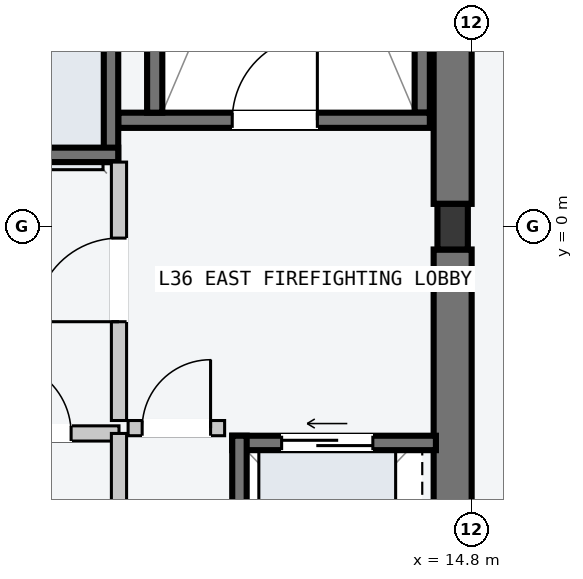
"""IFC4 building model, lengths in metres.
Left out: names, types, materials, properties, quantities, classifications, styles, units other than length and angle.
Written with IfcOpenShell. Run it as: python <this file> out.ifc"""

import sys

from ifc_helpers import new_model, si_unit, direction, frame, frame_2d, origin, origin_2d, place, context, subcontext, project, spatial, rectangle, i_section, extrude, element, fill, save


model = new_model("IFC4")
c1 = context("Model", 3, precision=1e-05, world=origin(), true_north=direction((0.0, 1.0)))
c2 = subcontext(c1, "Body", "Model", "MODEL_VIEW")
j1 = project(units=[si_unit("LENGTHUNIT", "METRE"), si_unit("PLANEANGLEUNIT", "RADIAN")], contexts=[c1])
p1 = place(None, origin())
s1 = spatial("IfcSite", under=j1, at=p1, CompositionType="ELEMENT")
p2 = place(p1, origin())
s2 = spatial("IfcBuilding", under=s1, at=p2, CompositionType="ELEMENT")
p3 = place(p2, frame((0.0, 0.0, 138.6)))
s3 = spatial("IfcBuildingStorey", under=s2, at=p3, CompositionType="ELEMENT", Elevation=138.6)
for number, where, z_axis, x_axis in (
    (1, (14.55, -9.45, -0.2), (0.0, 0.0, 1.0), (0.0, 1.0, 0.0)),
    (2, (14.55, 0.3, -0.2), (0.0, 0.0, 1.0), (0.0, 1.0, 0.0)),
):
    element("IfcWall", number, at=place(p3, frame(where, z_axis=z_axis, x_axis=x_axis)), inside=s3, PredefinedType="SHEAR", context=c2, shape_type="SweptSolid", body=[
        extrude(rectangle(XDim=9.15, YDim=0.5, at=frame_2d((4.575, 0.0))), origin(), (0.0, 0.0, 1.0), 3.6),
    ])
p4 = place(p3, frame((14.15, 1.5, -0.2), z_axis=(0.0, 0.0, 1.0), x_axis=(0.0, 1.0, 0.0)))
e3 = element("IfcWall", 3, at=p4, inside=s3, PredefinedType="SOLIDWALL", context=c2, shape_type="SweptSolid", body=[
    extrude(rectangle(XDim=7.8, YDim=0.2, at=frame_2d((3.9, 0.0))), origin(), (0.0, 0.0, 1.0), 3.6),
])
p5 = place(p3, frame((10.15, 1.4, -0.2), z_axis=(0.0, 0.0, 1.0), x_axis=(1.0, 0.0, 0.0)))
e4 = element("IfcWall", 4, at=p5, inside=s3, PredefinedType="SOLIDWALL", context=c2, shape_type="SweptSolid", body=[
    extrude(rectangle(XDim=4.1, YDim=0.2, at=frame_2d((2.05, 0.0))), origin(), (0.0, 0.0, 1.0), 3.6),
])
p6 = place(p5, frame((1.5, 0.0, 0.2)))
e5 = element("IfcOpeningElement", 5, at=p6, cuts=e4, PredefinedType="OPENING", context=c2, shape_type="SweptSolid", body=[
    extrude(rectangle(XDim=1.12, YDim=2.18, at=frame_2d((0.56, 1.09))), frame((0.0, 0.11, 0.0), z_axis=(0.0, -1.0, 0.0), x_axis=(1.0, 0.0, 0.0)), (0.0, 0.0, 1.0), 0.22),
])
p7 = place(p3, frame((10.63, 1.5, -0.2), z_axis=(0.0, 0.0, 1.0), x_axis=(0.0, 1.0, 0.0)))
e6 = element("IfcWall", 6, at=p7, inside=s3, PredefinedType="SOLIDWALL", context=c2, shape_type="SweptSolid", body=[
    extrude(rectangle(XDim=7.8, YDim=0.2, at=frame_2d((3.9, 0.0))), origin(), (0.0, 0.0, 1.0), 3.6),
])
p8 = place(p3, frame((14.55, 0.0, 0.0), z_axis=(0.0, 0.0, 1.0), x_axis=(1.0, 0.0, 0.0)))
e7 = element("IfcColumn", 7, at=p8, inside=s3, PredefinedType="COLUMN", context=c2, shape_type="SweptSolid", body=[
    extrude(i_section(OverallWidth=0.4, OverallDepth=0.6, WebThickness=0.022, FlangeThickness=0.036, at=origin_2d()), origin(), (0.0, 0.0, 1.0), 3.6),
])
p9 = place(p3, frame((10.055, 0.85, -0.2), z_axis=(0.0, 0.0, 1.0), x_axis=(0.0, 1.0, 0.0)))
e8 = element("IfcWall", 8, at=p9, inside=s3, PredefinedType="SOLIDWALL", context=c2, shape_type="SweptSolid", body=[
    extrude(rectangle(XDim=1.9, YDim=0.19, at=frame_2d((0.95, 0.0))), origin(), (0.0, 0.0, 1.0), 3.6),
])
p10 = place(p3, frame((7.95, 0.945, -0.2), z_axis=(0.0, 0.0, 1.0), x_axis=(1.0, 0.0, 0.0)))
e9 = element("IfcWall", 9, at=p10, inside=s3, PredefinedType="SOLIDWALL", context=c2, shape_type="SweptSolid", body=[
    extrude(rectangle(XDim=2.2, YDim=0.19, at=frame_2d((1.1, 0.0))), origin(), (0.0, 0.0, 1.0), 3.6),
])
p11 = place(p3, frame((11.65, -2.845, -0.2), z_axis=(0.0, 0.0, 1.0), x_axis=(1.0, 0.0, 0.0)))
e10 = element("IfcWall", 10, at=p11, inside=s3, PredefinedType="SOLIDWALL", context=c2, shape_type="SweptSolid", body=[
    extrude(rectangle(XDim=2.68, YDim=0.19, at=frame_2d((1.34, 0.0))), origin(), (0.0, 0.0, 1.0), 3.6),
])
p12 = place(p11, frame((0.65, 0.0, 0.2)))
e11 = element("IfcOpeningElement", 11, at=p12, cuts=e10, PredefinedType="OPENING", context=c2, shape_type="SweptSolid", body=[
    extrude(rectangle(XDim=1.2, YDim=2.2, at=frame_2d((0.6, 1.1))), frame((0.0, 0.105, 0.0), z_axis=(0.0, -1.0, 0.0), x_axis=(1.0, 0.0, 0.0)), (0.0, 0.0, 1.0), 0.21),
])
p13 = place(p3, frame((11.745, -5.35, -0.2), z_axis=(0.0, 0.0, 1.0), x_axis=(0.0, 1.0, 0.0)))
e12 = element("IfcWall", 12, at=p13, inside=s3, PredefinedType="SOLIDWALL", context=c2, shape_type="SweptSolid", body=[
    extrude(rectangle(XDim=2.6, YDim=0.19, at=frame_2d((1.3, 0.0))), origin(), (0.0, 0.0, 1.0), 3.6),
])
p14 = place(p3, frame((10.16, -2.55, 0.0), z_axis=(0.0, 0.0, 1.0), x_axis=(0.0, 1.0, 0.0)))
e13 = element("IfcWall", 13, at=p14, inside=s3, PredefinedType="PARTITIONING", context=c2, shape_type="SweptSolid", body=[
    extrude(rectangle(XDim=3.4, YDim=0.2, at=frame_2d((1.7, 0.0))), origin(), (0.0, 0.0, 1.0), 3.4),
])
p15 = place(p14, frame((1.3, 0.0, 0.0)))
e14 = element("IfcOpeningElement", 14, at=p15, cuts=e13, PredefinedType="OPENING", context=c2, shape_type="SweptSolid", body=[
    extrude(rectangle(XDim=1.1, YDim=2.15, at=frame_2d((0.55, 1.075))), frame((0.0, 0.11, 0.0), z_axis=(0.0, -1.0, 0.0), x_axis=(1.0, 0.0, 0.0)), (0.0, 0.0, 1.0), 0.22),
])
p16 = place(p3, frame((10.28, -2.65, 0.0), z_axis=(0.0, 0.0, 1.0), x_axis=(1.0, 0.0, 0.0)))
e15 = element("IfcWall", 15, at=p16, inside=s3, PredefinedType="PARTITIONING", context=c2, shape_type="SweptSolid", body=[
    extrude(rectangle(XDim=1.27, YDim=0.2, at=frame_2d((0.635, 0.0))), origin(), (0.0, 0.0, 1.0), 3.4),
])
p17 = place(p16, frame((0.185, 0.0, 0.0)))
e16 = element("IfcOpeningElement", 16, at=p17, cuts=e15, PredefinedType="OPENING", context=c2, shape_type="SweptSolid", body=[
    extrude(rectangle(XDim=0.9, YDim=2.15, at=frame_2d((0.45, 1.075))), frame((0.0, 0.11, 0.0), z_axis=(0.0, -1.0, 0.0), x_axis=(1.0, 0.0, 0.0)), (0.0, 0.0, 1.0), 0.22),
])
p18 = place(p3, frame((7.96, -2.72, 0.0), z_axis=(0.0, 0.0, 1.0), x_axis=(1.0, 0.0, 0.0)))
e17 = element("IfcWall", 17, at=p18, inside=s3, PredefinedType="PARTITIONING", context=c2, shape_type="SweptSolid", body=[
    extrude(rectangle(XDim=2.2, YDim=0.2, at=frame_2d((1.1, 0.0))), origin(), (0.0, 0.0, 1.0), 3.4),
])
p19 = place(p18, frame((0.62, 0.0, 0.0)))
e18 = element("IfcOpeningElement", 18, at=p19, cuts=e17, PredefinedType="OPENING", context=c2, shape_type="SweptSolid", body=[
    extrude(rectangle(XDim=0.95, YDim=2.1, at=frame_2d((0.475, 1.05))), frame((0.0, 0.11, 0.0), z_axis=(0.0, -1.0, 0.0), x_axis=(1.0, 0.0, 0.0)), (0.0, 0.0, 1.0), 0.22),
])
p20 = place(p3, frame((10.16, -5.16, 0.0), z_axis=(0.0, 0.0, 1.0), x_axis=(0.0, 1.0, 0.0)))
e19 = element("IfcWall", 19, at=p20, inside=s3, PredefinedType="PARTITIONING", context=c2, shape_type="SweptSolid", body=[
    extrude(rectangle(XDim=2.44, YDim=0.2, at=frame_2d((1.22, 0.0))), origin(), (0.0, 0.0, 1.0), 3.4),
])
p21 = place(p6, origin())
e20 = element("IfcDoor", 20, at=p21, inside=s3, OperationType="SINGLE_SWING_RIGHT", PredefinedType="DOOR", context=c2, shape_type="SweptSolid", body=[
    extrude(rectangle(XDim=1.12, YDim=2.18, at=frame_2d((0.56, 1.09))), frame((0.0, 0.025, 0.0), z_axis=(0.0, -1.0, 0.0), x_axis=(1.0, 0.0, 0.0)), (0.0, 0.0, 1.0), 0.05),
])
fill(e5, e20)
p22 = place(p12, origin())
e21 = element("IfcDoor", 21, at=p22, inside=s3, OperationType="SLIDING_TO_LEFT", PredefinedType="DOOR", context=c2, shape_type="SweptSolid", body=[
    extrude(rectangle(XDim=1.2, YDim=2.2, at=frame_2d((0.6, 1.1))), frame((0.0, 0.025, 0.0), z_axis=(0.0, -1.0, 0.0), x_axis=(1.0, 0.0, 0.0)), (0.0, 0.0, 1.0), 0.05),
])
fill(e11, e21)
p23 = place(p15, origin())
e22 = element("IfcDoor", 22, at=p23, inside=s3, OperationType="SINGLE_SWING_LEFT", PredefinedType="DOOR", context=c2, shape_type="SweptSolid", body=[
    extrude(rectangle(XDim=1.1, YDim=2.15, at=frame_2d((0.55, 1.075))), frame((0.0, 0.025, 0.0), z_axis=(0.0, -1.0, 0.0), x_axis=(1.0, 0.0, 0.0)), (0.0, 0.0, 1.0), 0.05),
])
fill(e14, e22)
p24 = place(p17, origin())
e23 = element("IfcDoor", 23, at=p24, inside=s3, OperationType="SINGLE_SWING_RIGHT", PredefinedType="DOOR", context=c2, shape_type="SweptSolid", body=[
    extrude(rectangle(XDim=0.9, YDim=2.15, at=frame_2d((0.45, 1.075))), frame((0.0, 0.025, 0.0), z_axis=(0.0, -1.0, 0.0), x_axis=(1.0, 0.0, 0.0)), (0.0, 0.0, 1.0), 0.05),
])
fill(e16, e23)
p25 = place(p19, origin())
e24 = element("IfcDoor", 24, at=p25, inside=s3, OperationType="SINGLE_SWING_LEFT", PredefinedType="DOOR", context=c2, shape_type="SweptSolid", body=[
    extrude(rectangle(XDim=0.95, YDim=2.1, at=frame_2d((0.475, 1.05))), frame((0.0, 0.025, 0.0), z_axis=(0.0, -1.0, 0.0), x_axis=(1.0, 0.0, 0.0)), (0.0, 0.0, 1.0), 0.05),
])
fill(e18, e24)
save(model, sys.argv[1])
